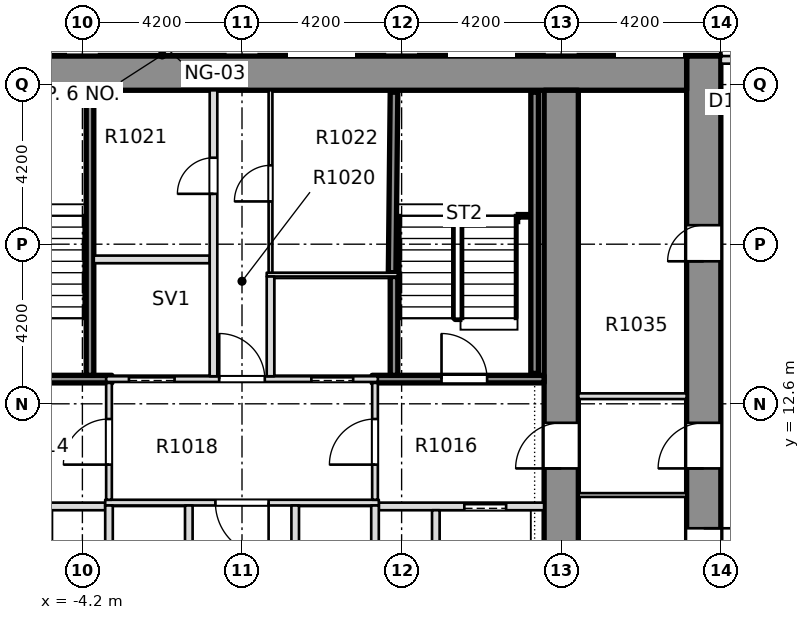
"""IFC4 building model, lengths in metres.
Left out: names, types, materials, properties, quantities, classifications, styles, units other than length and angle.
Written with IfcOpenShell. Run it as: python <this file> out.ifc"""

import sys

from ifc_helpers import new_model, si_unit, direction, frame, frame_2d, origin, place, context, subcontext, project, spatial, rectangle, extrude, element, fill, save


model = new_model("IFC4")
c1 = context("Model", 3, precision=1e-05, world=origin(), true_north=direction((0.0, 1.0)))
c2 = subcontext(c1, "Body", "Model", "MODEL_VIEW")
j1 = project(units=[si_unit("LENGTHUNIT", "METRE"), si_unit("PLANEANGLEUNIT", "RADIAN")], contexts=[c1])
p1 = place(None, origin())
s1 = spatial("IfcSite", under=j1, at=p1, CompositionType="ELEMENT")
p2 = place(p1, origin())
s2 = spatial("IfcBuilding", under=s1, at=p2, CompositionType="ELEMENT")
p3 = place(p2, frame((0.0, 0.0, 48.3)))
s3 = spatial("IfcBuildingStorey", under=s2, at=p3, CompositionType="ELEMENT", Elevation=48.3)
p4 = place(p3, frame((12.15, -8.4, -0.32), z_axis=(0.0, 0.0, 1.0), x_axis=(0.0, 1.0, 0.0)))
e1 = element("IfcWall", 1, at=p4, inside=s3, PredefinedType="SHEAR", context=c2, shape_type="SweptSolid", body=[
    extrude(rectangle(XDim=30.15, YDim=0.9, at=frame_2d((15.075, 0.0))), origin(), (0.0, 0.0, 1.0), 3.45),
])
p5 = place(p4, frame((2.875, 0.0, 0.32)))
e2 = element("IfcOpeningElement", 2, at=p5, cuts=e1, PredefinedType="OPENING", context=c2, shape_type="SweptSolid", body=[
    extrude(rectangle(XDim=0.95, YDim=2.1, at=frame_2d((0.475, 1.05))), frame((0.0, 0.46, 0.0), z_axis=(0.0, -1.0, 0.0), x_axis=(1.0, 0.0, 0.0)), (0.0, 0.0, 1.0), 0.92),
])
p6 = place(p4, frame((6.575, 0.0, 0.32)))
e3 = element("IfcOpeningElement", 3, at=p6, cuts=e1, PredefinedType="OPENING", context=c2, shape_type="SweptSolid", body=[
    extrude(rectangle(XDim=0.95, YDim=2.1, at=frame_2d((0.475, 1.05))), frame((0.0, 0.46, 0.0), z_axis=(0.0, -1.0, 0.0), x_axis=(1.0, 0.0, 0.0)), (0.0, 0.0, 1.0), 0.92),
])
p7 = place(p4, frame((9.425, 0.0, 0.32)))
e4 = element("IfcOpeningElement", 4, at=p7, cuts=e1, PredefinedType="OPENING", context=c2, shape_type="SweptSolid", body=[
    extrude(rectangle(XDim=0.95, YDim=2.1, at=frame_2d((0.475, 1.05))), frame((0.0, 0.46, 0.0), z_axis=(0.0, -1.0, 0.0), x_axis=(1.0, 0.0, 0.0)), (0.0, 0.0, 1.0), 0.92),
])
p8 = place(p4, frame((13.225, 0.0, 0.32)))
e5 = element("IfcOpeningElement", 5, at=p8, cuts=e1, PredefinedType="OPENING", context=c2, shape_type="SweptSolid", body=[
    extrude(rectangle(XDim=0.95, YDim=2.1, at=frame_2d((0.475, 1.05))), frame((0.0, 0.46, 0.0), z_axis=(0.0, -1.0, 0.0), x_axis=(1.0, 0.0, 0.0)), (0.0, 0.0, 1.0), 0.92),
])
p9 = place(p4, frame((16.775, 0.0, 0.32)))
e6 = element("IfcOpeningElement", 6, at=p9, cuts=e1, PredefinedType="OPENING", context=c2, shape_type="SweptSolid", body=[
    extrude(rectangle(XDim=0.95, YDim=2.1, at=frame_2d((0.475, 1.05))), frame((0.0, 0.46, 0.0), z_axis=(0.0, -1.0, 0.0), x_axis=(1.0, 0.0, 0.0)), (0.0, 0.0, 1.0), 0.92),
])
p10 = place(p4, frame((24.75, 0.0, 0.32)))
e7 = element("IfcOpeningElement", 7, at=p10, cuts=e1, PredefinedType="OPENING", context=c2, shape_type="SweptSolid", body=[
    extrude(rectangle(XDim=0.95, YDim=2.1, at=frame_2d((0.475, 1.05))), frame((0.0, 0.46, 0.0), z_axis=(0.0, -1.0, 0.0), x_axis=(1.0, 0.0, 0.0)), (0.0, 0.0, 1.0), 0.92),
])
p11 = place(p4, frame((19.3, 0.0, 0.32)))
e8 = element("IfcOpeningElement", 8, at=p11, cuts=e1, PredefinedType="OPENING", context=c2, shape_type="SweptSolid", body=[
    extrude(rectangle(XDim=1.2, YDim=2.1, at=frame_2d((0.6, 1.05))), frame((0.0, 0.46, 0.0), z_axis=(0.0, -1.0, 0.0), x_axis=(1.0, 0.0, 0.0)), (0.0, 0.0, 1.0), 0.92),
])
p12 = place(p3, frame((-11.7, 21.3, -0.32), z_axis=(0.0, 0.0, 1.0), x_axis=(1.0, 0.0, 0.0)))
e9 = element("IfcWall", 9, at=p12, inside=s3, PredefinedType="SOLIDWALL", context=c2, shape_type="SweptSolid", body=[
    extrude(rectangle(XDim=23.4, YDim=0.9, at=frame_2d((11.7, 0.0))), origin(), (0.0, 0.0, 1.0), 3.45),
])
p13 = place(p3, frame((8.4, -7.5, -0.32), z_axis=(0.0, 0.0, 1.0), x_axis=(0.0, 1.0, 0.0)))
e10 = element("IfcWall", 10, at=p13, inside=s3, PredefinedType="SHEAR", context=c2, shape_type="SweptSolid", body=[
    extrude(rectangle(XDim=28.35, YDim=0.9, at=frame_2d((14.175, 0.0))), origin(), (0.0, 0.0, 1.0), 3.45),
])
p14 = place(p13, frame((18.4, 0.0, 0.32)))
e11 = element("IfcOpeningElement", 11, at=p14, cuts=e10, PredefinedType="OPENING", context=c2, shape_type="SweptSolid", body=[
    extrude(rectangle(XDim=1.2, YDim=2.1, at=frame_2d((0.6, 1.05))), frame((0.0, 0.46, 0.0), z_axis=(0.0, -1.0, 0.0), x_axis=(1.0, 0.0, 0.0)), (0.0, 0.0, 1.0), 0.92),
])
p15 = place(p3, frame((16.1, 21.65, 0.0), z_axis=(0.0, 0.0, 1.0), x_axis=(-1.0, 0.0, 0.0)))
e12 = element("IfcWall", 12, at=p15, inside=s3, PredefinedType="STANDARD", context=c2, shape_type="SweptSolid", body=[
    extrude(rectangle(XDim=3.5, YDim=0.2, at=frame_2d((1.75, 0.0))), origin(), (0.0, 0.0, 1.0), 3.13),
])
p16 = place(p15, frame((2.2, 0.0, 0.0)))
e13 = element("IfcOpeningElement", 13, at=p16, cuts=e12, PredefinedType="OPENING", context=c2, shape_type="SweptSolid", body=[
    extrude(rectangle(XDim=1.0, YDim=2.4, at=frame_2d((0.5, 1.2))), frame((0.0, 0.11, 0.0), z_axis=(0.0, -1.0, 0.0), x_axis=(1.0, 0.0, 0.0)), (0.0, 0.0, 1.0), 0.22),
])
p17 = place(p3, frame((-7.949, 9.9, 0.0), z_axis=(0.0, 0.0, 1.0), x_axis=(1.0, 0.0, 0.0)))
e14 = element("IfcWall", 14, at=p17, inside=s3, PredefinedType="PARTITIONING", context=c2, shape_type="SweptSolid", body=[
    extrude(rectangle(XDim=4.349, YDim=0.2, at=frame_2d((2.174, 0.0))), origin(), (0.0, 0.0, 1.0), 3.13),
])
p18 = place(p17, frame((0.999, 0.0, 0.0)))
e15 = element("IfcOpeningElement", 15, at=p18, cuts=e14, PredefinedType="OPENING", context=c2, shape_type="SweptSolid", body=[
    extrude(rectangle(XDim=1.1, YDim=2.1, at=frame_2d((0.55, 1.05))), frame((0.0, 0.11, 0.0), z_axis=(0.0, -1.0, 0.0), x_axis=(1.0, 0.0, 0.0)), (0.0, 0.0, 1.0), 0.22),
])
p19 = place(p3, frame((3.6, 9.9, 0.0), z_axis=(0.0, 0.0, 1.0), x_axis=(1.0, 0.0, 0.0)))
e16 = element("IfcWall", 16, at=p19, inside=s3, PredefinedType="PARTITIONING", context=c2, shape_type="SweptSolid", body=[
    extrude(rectangle(XDim=4.349, YDim=0.2, at=frame_2d((2.174, 0.0))), origin(), (0.0, 0.0, 1.0), 3.13),
])
p20 = place(p19, frame((2.25, 0.0, 0.0)))
e17 = element("IfcOpeningElement", 17, at=p20, cuts=e16, PredefinedType="OPENING", context=c2, shape_type="SweptSolid", body=[
    extrude(rectangle(XDim=1.1, YDim=2.1, at=frame_2d((0.55, 1.05))), frame((0.0, 0.11, 0.0), z_axis=(0.0, -1.0, 0.0), x_axis=(1.0, 0.0, 0.0)), (0.0, 0.0, 1.0), 0.22),
])
p21 = place(p3, frame((-3.6, 10.0, 0.0), z_axis=(0.0, 0.0, 1.0), x_axis=(1.0, 0.0, 0.0)))
e18 = element("IfcWall", 18, at=p21, inside=s3, PredefinedType="PARTITIONING", context=c2, shape_type="SweptSolid", body=[
    extrude(rectangle(XDim=7.2, YDim=0.15, at=frame_2d((3.6, 0.0))), origin(), (0.0, 0.0, 1.0), 3.13),
])
p22 = place(p21, frame((2.9, 0.0, 0.0)))
e19 = element("IfcOpeningElement", 19, at=p22, cuts=e18, PredefinedType="OPENING", context=c2, shape_type="SweptSolid", body=[
    extrude(rectangle(XDim=1.4, YDim=2.1, at=frame_2d((0.7, 1.05))), frame((0.0, 0.085, 0.0), z_axis=(0.0, -1.0, 0.0), x_axis=(1.0, 0.0, 0.0)), (0.0, 0.0, 1.0), 0.17),
])
p23 = place(p3, frame((-7.949, 13.25, 0.0), z_axis=(0.0, 0.0, 1.0), x_axis=(1.0, 0.0, 0.0)))
e20 = element("IfcWall", 20, at=p23, inside=s3, PredefinedType="SOLIDWALL", context=c2, shape_type="SweptSolid", body=[
    extrude(rectangle(XDim=4.524, YDim=0.2, at=frame_2d((2.262, 0.0))), origin(), (0.0, 0.0, 1.0), 3.13),
])
p24 = place(p23, frame((1.499, 0.0, 0.0)))
e21 = element("IfcOpeningElement", 21, at=p24, cuts=e20, PredefinedType="OPENING", context=c2, shape_type="SweptSolid", body=[
    extrude(rectangle(XDim=1.2, YDim=2.1, at=frame_2d((0.6, 1.05))), frame((0.0, 0.11, 0.0), z_axis=(0.0, -1.0, 0.0), x_axis=(1.0, 0.0, 0.0)), (0.0, 0.0, 1.0), 0.22),
])
p25 = place(p3, frame((-3.575, 13.25, 0.0), z_axis=(0.0, 0.0, 1.0), x_axis=(1.0, 0.0, 0.0)))
e22 = element("IfcWall", 22, at=p25, inside=s3, PredefinedType="PARTITIONING", context=c2, shape_type="SweptSolid", body=[
    extrude(rectangle(XDim=7.15, YDim=0.15, at=frame_2d((3.575, 0.0))), origin(), (0.0, 0.0, 1.0), 3.13),
])
p26 = place(p25, frame((0.6, 0.0, 0.0)))
e23 = element("IfcOpeningElement", 23, at=p26, cuts=e22, PredefinedType="OPENING", context=c2, shape_type="SweptSolid", body=[
    extrude(rectangle(XDim=1.2, YDim=2.1, at=frame_2d((0.6, 1.05))), frame((0.0, 0.085, 0.0), z_axis=(0.0, -1.0, 0.0), x_axis=(1.0, 0.0, 0.0)), (0.0, 0.0, 1.0), 0.17),
])
p27 = place(p25, frame((5.4, 0.0, 0.0)))
e24 = element("IfcOpeningElement", 24, at=p27, cuts=e22, PredefinedType="OPENING", context=c2, shape_type="SweptSolid", body=[
    extrude(rectangle(XDim=1.1, YDim=2.1, at=frame_2d((0.55, 1.05))), frame((0.0, 0.085, 0.0), z_axis=(0.0, -1.0, 0.0), x_axis=(1.0, 0.0, 0.0)), (0.0, 0.0, 1.0), 0.17),
])
p28 = place(p25, frame((2.975, 0.0, 0.0)))
e25 = element("IfcOpeningElement", 25, at=p28, cuts=e22, PredefinedType="OPENING", context=c2, shape_type="SweptSolid", body=[
    extrude(rectangle(XDim=1.2, YDim=2.1, at=frame_2d((0.6, 1.05))), frame((0.0, 0.085, 0.0), z_axis=(0.0, -1.0, 0.0), x_axis=(1.0, 0.0, 0.0)), (0.0, 0.0, 1.0), 0.17),
])
p29 = place(p3, frame((3.425, 13.25, 0.0), z_axis=(0.0, 0.0, 1.0), x_axis=(1.0, 0.0, 0.0)))
e26 = element("IfcWall", 26, at=p29, inside=s3, PredefinedType="SOLIDWALL", context=c2, shape_type="SweptSolid", body=[
    extrude(rectangle(XDim=4.524, YDim=0.2, at=frame_2d((2.262, 0.0))), origin(), (0.0, 0.0, 1.0), 3.13),
])
p30 = place(p29, frame((1.825, 0.0, 0.0)))
e27 = element("IfcOpeningElement", 27, at=p30, cuts=e26, PredefinedType="OPENING", context=c2, shape_type="SweptSolid", body=[
    extrude(rectangle(XDim=1.2, YDim=2.1, at=frame_2d((0.6, 1.05))), frame((0.0, 0.11, 0.0), z_axis=(0.0, -1.0, 0.0), x_axis=(1.0, 0.0, 0.0)), (0.0, 0.0, 1.0), 0.22),
])
p31 = place(p3, frame((0.65, 16.0, 0.0), z_axis=(0.0, 0.0, 1.0), x_axis=(1.0, 0.0, 0.0)))
e28 = element("IfcWall", 28, at=p31, inside=s3, PredefinedType="PARTITIONING", context=c2, shape_type="SweptSolid", body=[
    extrude(rectangle(XDim=3.45, YDim=0.1, at=frame_2d((1.725, 0.0))), origin(), (0.0, 0.0, 1.0), 3.13),
])
p32 = place(p3, frame((-3.9, 16.4, 0.0), z_axis=(0.0, 0.0, 1.0), x_axis=(1.0, 0.0, 0.0)))
e29 = element("IfcWall", 29, at=p32, inside=s3, PredefinedType="PARTITIONING", context=c2, shape_type="SweptSolid", body=[
    extrude(rectangle(XDim=3.05, YDim=0.2, at=frame_2d((1.525, 0.0))), origin(), (0.0, 0.0, 1.0), 3.13),
])
p33 = place(p3, frame((-4.0, 13.35, 0.0), z_axis=(0.0, 0.0, 1.0), x_axis=(0.0, 1.0, 0.0)))
e30 = element("IfcWall", 30, at=p33, inside=s3, PredefinedType="SOLIDWALL", context=c2, shape_type="SweptSolid", body=[
    extrude(rectangle(XDim=7.499, YDim=0.2, at=frame_2d((3.75, 0.0))), origin(), (0.0, 0.0, 1.0), 3.13),
])
p34 = place(p3, frame((-3.5, 7.075, 0.0), z_axis=(0.0, 0.0, 1.0), x_axis=(0.0, 1.0, 0.0)))
e31 = element("IfcWall", 31, at=p34, inside=s3, PredefinedType="PARTITIONING", context=c2, shape_type="SweptSolid", body=[
    extrude(rectangle(XDim=2.85, YDim=0.2, at=frame_2d((1.425, 0.0))), origin(), (0.0, 0.0, 1.0), 3.13),
])
p35 = place(p3, frame((-3.5, 10.075, 0.0), z_axis=(0.0, 0.0, 1.0), x_axis=(0.0, 1.0, 0.0)))
e32 = element("IfcWall", 32, at=p35, inside=s3, PredefinedType="PARTITIONING", context=c2, shape_type="SweptSolid", body=[
    extrude(rectangle(XDim=3.075, YDim=0.15, at=frame_2d((1.538, 0.0))), origin(), (0.0, 0.0, 1.0), 3.13),
])
p36 = place(p35, frame((0.925, 0.0, 0.0)))
e33 = element("IfcOpeningElement", 33, at=p36, cuts=e32, PredefinedType="OPENING", context=c2, shape_type="SweptSolid", body=[
    extrude(rectangle(XDim=1.2, YDim=2.1, at=frame_2d((0.6, 1.05))), frame((0.0, 0.085, 0.0), z_axis=(0.0, -1.0, 0.0), x_axis=(1.0, 0.0, 0.0)), (0.0, 0.0, 1.0), 0.17),
])
p37 = place(p3, frame((-1.4, 7.075, 0.0), z_axis=(0.0, 0.0, 1.0), x_axis=(0.0, 1.0, 0.0)))
e34 = element("IfcWall", 34, at=p37, inside=s3, PredefinedType="PARTITIONING", context=c2, shape_type="SweptSolid", body=[
    extrude(rectangle(XDim=2.85, YDim=0.2, at=frame_2d((1.425, 0.0))), origin(), (0.0, 0.0, 1.0), 3.13),
])
p38 = place(p3, frame((-0.75, 13.325, 0.0), z_axis=(0.0, 0.0, 1.0), x_axis=(0.0, 1.0, 0.0)))
e35 = element("IfcWall", 35, at=p38, inside=s3, PredefinedType="PARTITIONING", context=c2, shape_type="SweptSolid", body=[
    extrude(rectangle(XDim=7.524, YDim=0.2, at=frame_2d((3.762, 0.0))), origin(), (0.0, 0.0, 1.0), 3.13),
])
p39 = place(p38, frame((4.8, 0.0, 0.0)))
e36 = element("IfcOpeningElement", 36, at=p39, cuts=e35, PredefinedType="OPENING", context=c2, shape_type="SweptSolid", body=[
    extrude(rectangle(XDim=0.95, YDim=2.1, at=frame_2d((0.475, 1.05))), frame((0.0, 0.11, 0.0), z_axis=(0.0, -1.0, 0.0), x_axis=(1.0, 0.0, 0.0)), (0.0, 0.0, 1.0), 0.22),
])
p40 = place(p3, frame((0.75, 13.325, 0.0), z_axis=(0.0, 0.0, 1.0), x_axis=(0.0, 1.0, 0.0)))
e37 = element("IfcWall", 37, at=p40, inside=s3, PredefinedType="PARTITIONING", context=c2, shape_type="SweptSolid", body=[
    extrude(rectangle(XDim=2.625, YDim=0.2, at=frame_2d((1.312, 0.0))), origin(), (0.0, 0.0, 1.0), 3.13),
])
p41 = place(p3, frame((0.75, 16.05, 0.0), z_axis=(0.0, 0.0, 1.0), x_axis=(0.0, 1.0, 0.0)))
e38 = element("IfcWall", 38, at=p41, inside=s3, PredefinedType="PARTITIONING", context=c2, shape_type="SweptSolid", body=[
    extrude(rectangle(XDim=4.799, YDim=0.1, at=frame_2d((2.399, 0.0))), origin(), (0.0, 0.0, 1.0), 3.13),
])
p42 = place(p41, frame((1.875, 0.0, 0.0)))
e39 = element("IfcOpeningElement", 39, at=p42, cuts=e38, PredefinedType="OPENING", context=c2, shape_type="SweptSolid", body=[
    extrude(rectangle(XDim=0.95, YDim=2.1, at=frame_2d((0.475, 1.05))), frame((0.0, 0.06, 0.0), z_axis=(0.0, -1.0, 0.0), x_axis=(1.0, 0.0, 0.0)), (0.0, 0.0, 1.0), 0.12),
])
for number, where, z_axis, x_axis in (
    (40, (1.4, 7.075, 0.0), (0.0, 0.0, 1.0), (0.0, 1.0, 0.0)),
    (41, (3.5, 7.075, 0.0), (0.0, 0.0, 1.0), (0.0, 1.0, 0.0)),
):
    element("IfcWall", number, at=place(p3, frame(where, z_axis=z_axis, x_axis=x_axis)), inside=s3, PredefinedType="PARTITIONING", context=c2, shape_type="SweptSolid", body=[
        extrude(rectangle(XDim=2.85, YDim=0.2, at=frame_2d((1.425, 0.0))), origin(), (0.0, 0.0, 1.0), 3.13),
    ])
p43 = place(p3, frame((3.5, 10.075, 0.0), z_axis=(0.0, 0.0, 1.0), x_axis=(0.0, 1.0, 0.0)))
e42 = element("IfcWall", 42, at=p43, inside=s3, PredefinedType="PARTITIONING", context=c2, shape_type="SweptSolid", body=[
    extrude(rectangle(XDim=3.075, YDim=0.15, at=frame_2d((1.538, 0.0))), origin(), (0.0, 0.0, 1.0), 3.13),
])
p44 = place(p43, frame((0.925, 0.0, 0.0)))
e43 = element("IfcOpeningElement", 43, at=p44, cuts=e42, PredefinedType="OPENING", context=c2, shape_type="SweptSolid", body=[
    extrude(rectangle(XDim=1.2, YDim=2.1, at=frame_2d((0.6, 1.05))), frame((0.0, 0.085, 0.0), z_axis=(0.0, -1.0, 0.0), x_axis=(1.0, 0.0, 0.0)), (0.0, 0.0, 1.0), 0.17),
])
p45 = place(p3, frame((4.0, 13.35, 0.0), z_axis=(0.0, 0.0, 1.0), x_axis=(0.0, 1.0, 0.0)))
e44 = element("IfcWall", 44, at=p45, inside=s3, PredefinedType="SOLIDWALL", context=c2, shape_type="SweptSolid", body=[
    extrude(rectangle(XDim=2.6, YDim=0.2, at=frame_2d((1.3, 0.0))), origin(), (0.0, 0.0, 1.0), 3.13),
])
p46 = place(p3, frame((3.95, 16.05, 0.0), z_axis=(0.0, 0.0, 1.0), x_axis=(0.010538176883, 0.999944471872, 0.0)))
e45 = element("IfcWall", 45, at=p46, inside=s3, PredefinedType="SOLIDWALL", context=c2, shape_type="SweptSolid", body=[
    extrude(rectangle(XDim=4.749, YDim=0.2, at=frame_2d((2.375, 0.0))), origin(), (0.0, 0.0, 1.0), 3.13),
])
p47 = place(p3, frame((5.1, 7.075, 0.0), z_axis=(0.0, 0.0, 1.0), x_axis=(0.0, 1.0, 0.0)))
e46 = element("IfcWall", 46, at=p47, inside=s3, PredefinedType="PARTITIONING", context=c2, shape_type="SweptSolid", body=[
    extrude(rectangle(XDim=2.725, YDim=0.2, at=frame_2d((1.363, 0.0))), origin(), (0.0, 0.0, 1.0), 3.13),
])
p48 = place(p3, frame((8.851, 10.2, 0.0), z_axis=(0.0, 0.0, 1.0), x_axis=(1.0, 0.0, 0.0)))
e47 = element("IfcWall", 47, at=p48, inside=s3, PredefinedType="PARTITIONING", context=c2, shape_type="SweptSolid", body=[
    extrude(rectangle(XDim=2.848, YDim=0.1, at=frame_2d((1.424, 0.0))), origin(), (0.0, 0.0, 1.0), 3.13),
])
p49 = place(p3, frame((8.851, 12.8, 0.0), z_axis=(0.0, 0.0, 1.0), x_axis=(1.0, 0.0, 0.0)))
e48 = element("IfcWall", 48, at=p49, inside=s3, PredefinedType="PARTITIONING", context=c2, shape_type="SweptSolid", body=[
    extrude(rectangle(XDim=2.848, YDim=0.15, at=frame_2d((1.424, 0.0))), origin(), (0.0, 0.0, 1.0), 3.13),
])
p50 = place(p3, frame((7.7, 13.4, 0.0), z_axis=(0.0, 0.0, 1.0), x_axis=(0.0, 1.0, 0.0)))
e49 = element("IfcWall", 49, at=p50, inside=s3, PredefinedType="SOLIDWALL", context=c2, shape_type="SweptSolid", body=[
    extrude(rectangle(XDim=7.4, YDim=0.2, at=frame_2d((3.7, 0.0))), origin(), (0.0, 0.0, 1.0), 3.13),
])
p51 = place(p30, origin())
e50 = element("IfcDoor", 50, at=p51, inside=s3, OperationType="SINGLE_SWING_RIGHT", PredefinedType="DOOR", context=c2, shape_type="SweptSolid", body=[
    extrude(rectangle(XDim=1.2, YDim=2.1, at=frame_2d((0.6, 1.05))), frame((0.0, 0.025, 0.0), z_axis=(0.0, -1.0, 0.0), x_axis=(1.0, 0.0, 0.0)), (0.0, 0.0, 1.0), 0.05),
])
fill(e27, e50)
p52 = place(p20, origin())
e51 = element("IfcDoor", 51, at=p52, inside=s3, OperationType="SLIDING_TO_LEFT", PredefinedType="DOOR", context=c2, shape_type="SweptSolid", body=[
    extrude(rectangle(XDim=1.1, YDim=2.1, at=frame_2d((0.55, 1.05))), frame((0.0, 0.025, 0.0), z_axis=(0.0, -1.0, 0.0), x_axis=(1.0, 0.0, 0.0)), (0.0, 0.0, 1.0), 0.05),
])
fill(e17, e51)
p53 = place(p22, origin())
e52 = element("IfcDoor", 52, at=p53, inside=s3, OperationType="SINGLE_SWING_RIGHT", PredefinedType="DOOR", context=c2, shape_type="SweptSolid", body=[
    extrude(rectangle(XDim=1.4, YDim=2.1, at=frame_2d((0.7, 1.05))), frame((0.0, 0.025, 0.0), z_axis=(0.0, -1.0, 0.0), x_axis=(1.0, 0.0, 0.0)), (0.0, 0.0, 1.0), 0.05),
])
fill(e19, e52)
p54 = place(p26, origin())
e53 = element("IfcDoor", 53, at=p54, inside=s3, OperationType="SLIDING_TO_RIGHT", PredefinedType="DOOR", context=c2, shape_type="SweptSolid", body=[
    extrude(rectangle(XDim=1.2, YDim=2.1, at=frame_2d((0.6, 1.05))), frame((0.0, 0.025, 0.0), z_axis=(0.0, -1.0, 0.0), x_axis=(1.0, 0.0, 0.0)), (0.0, 0.0, 1.0), 0.05),
])
fill(e23, e53)
p55 = place(p27, origin())
e54 = element("IfcDoor", 54, at=p55, inside=s3, OperationType="SLIDING_TO_LEFT", PredefinedType="DOOR", context=c2, shape_type="SweptSolid", body=[
    extrude(rectangle(XDim=1.1, YDim=2.1, at=frame_2d((0.55, 1.05))), frame((0.0, 0.025, 0.0), z_axis=(0.0, -1.0, 0.0), x_axis=(1.0, 0.0, 0.0)), (0.0, 0.0, 1.0), 0.05),
])
fill(e24, e54)
p56 = place(p28, origin())
e55 = element("IfcDoor", 55, at=p56, inside=s3, OperationType="SINGLE_SWING_RIGHT", PredefinedType="DOOR", context=c2, shape_type="SweptSolid", body=[
    extrude(rectangle(XDim=1.2, YDim=2.1, at=frame_2d((0.6, 1.05))), frame((0.0, 0.025, 0.0), z_axis=(0.0, -1.0, 0.0), x_axis=(1.0, 0.0, 0.0)), (0.0, 0.0, 1.0), 0.05),
])
fill(e25, e55)
p57 = place(p39, origin())
e56 = element("IfcDoor", 56, at=p57, inside=s3, OperationType="SINGLE_SWING_RIGHT", PredefinedType="DOOR", context=c2, shape_type="SweptSolid", body=[
    extrude(rectangle(XDim=0.95, YDim=2.1, at=frame_2d((0.475, 1.05))), frame((0.0, 0.025, 0.0), z_axis=(0.0, -1.0, 0.0), x_axis=(1.0, 0.0, 0.0)), (0.0, 0.0, 1.0), 0.05),
])
fill(e36, e56)
p58 = place(p42, origin())
e57 = element("IfcDoor", 57, at=p58, inside=s3, OperationType="SINGLE_SWING_LEFT", PredefinedType="DOOR", context=c2, shape_type="SweptSolid", body=[
    extrude(rectangle(XDim=0.95, YDim=2.1, at=frame_2d((0.475, 1.05))), frame((0.0, 0.025, 0.0), z_axis=(0.0, -1.0, 0.0), x_axis=(1.0, 0.0, 0.0)), (0.0, 0.0, 1.0), 0.05),
])
fill(e39, e57)
p59 = place(p36, origin())
e58 = element("IfcDoor", 58, at=p59, inside=s3, OperationType="SINGLE_SWING_RIGHT", PredefinedType="DOOR", context=c2, shape_type="SweptSolid", body=[
    extrude(rectangle(XDim=1.2, YDim=2.1, at=frame_2d((0.6, 1.05))), frame((0.0, 0.025, 0.0), z_axis=(0.0, -1.0, 0.0), x_axis=(1.0, 0.0, 0.0)), (0.0, 0.0, 1.0), 0.05),
])
fill(e33, e58)
p60 = place(p44, origin())
e59 = element("IfcDoor", 59, at=p60, inside=s3, OperationType="SINGLE_SWING_LEFT", PredefinedType="DOOR", context=c2, shape_type="SweptSolid", body=[
    extrude(rectangle(XDim=1.2, YDim=2.1, at=frame_2d((0.6, 1.05))), frame((0.0, 0.025, 0.0), z_axis=(0.0, -1.0, 0.0), x_axis=(1.0, 0.0, 0.0)), (0.0, 0.0, 1.0), 0.05),
])
fill(e43, e59)
p61 = place(p9, origin())
e60 = element("IfcDoor", 60, at=p61, inside=s3, OperationType="SINGLE_SWING_LEFT", PredefinedType="DOOR", context=c2, shape_type="SweptSolid", body=[
    extrude(rectangle(XDim=0.95, YDim=2.1, at=frame_2d((0.475, 1.05))), frame((0.0, 0.025, 0.0), z_axis=(0.0, -1.0, 0.0), x_axis=(1.0, 0.0, 0.0)), (0.0, 0.0, 1.0), 0.05),
])
fill(e6, e60)
p62 = place(p10, origin())
e61 = element("IfcDoor", 61, at=p62, inside=s3, OperationType="SINGLE_SWING_LEFT", PredefinedType="DOOR", context=c2, shape_type="SweptSolid", body=[
    extrude(rectangle(XDim=0.95, YDim=2.1, at=frame_2d((0.475, 1.05))), frame((0.0, 0.025, 0.0), z_axis=(0.0, -1.0, 0.0), x_axis=(1.0, 0.0, 0.0)), (0.0, 0.0, 1.0), 0.05),
])
fill(e7, e61)
p63 = place(p11, origin())
e62 = element("IfcDoor", 62, at=p63, inside=s3, OperationType="SINGLE_SWING_LEFT", PredefinedType="DOOR", context=c2, shape_type="SweptSolid", body=[
    extrude(rectangle(XDim=1.2, YDim=2.1, at=frame_2d((0.6, 1.05))), frame((0.0, 0.025, 0.0), z_axis=(0.0, -1.0, 0.0), x_axis=(1.0, 0.0, 0.0)), (0.0, 0.0, 1.0), 0.05),
])
fill(e8, e62)
p64 = place(p14, origin())
e63 = element("IfcDoor", 63, at=p64, inside=s3, OperationType="SINGLE_SWING_LEFT", PredefinedType="DOOR", context=c2, shape_type="SweptSolid", body=[
    extrude(rectangle(XDim=1.2, YDim=2.1, at=frame_2d((0.6, 1.05))), frame((0.0, 0.025, 0.0), z_axis=(0.0, -1.0, 0.0), x_axis=(1.0, 0.0, 0.0)), (0.0, 0.0, 1.0), 0.05),
])
fill(e11, e63)
save(model, sys.argv[1])
